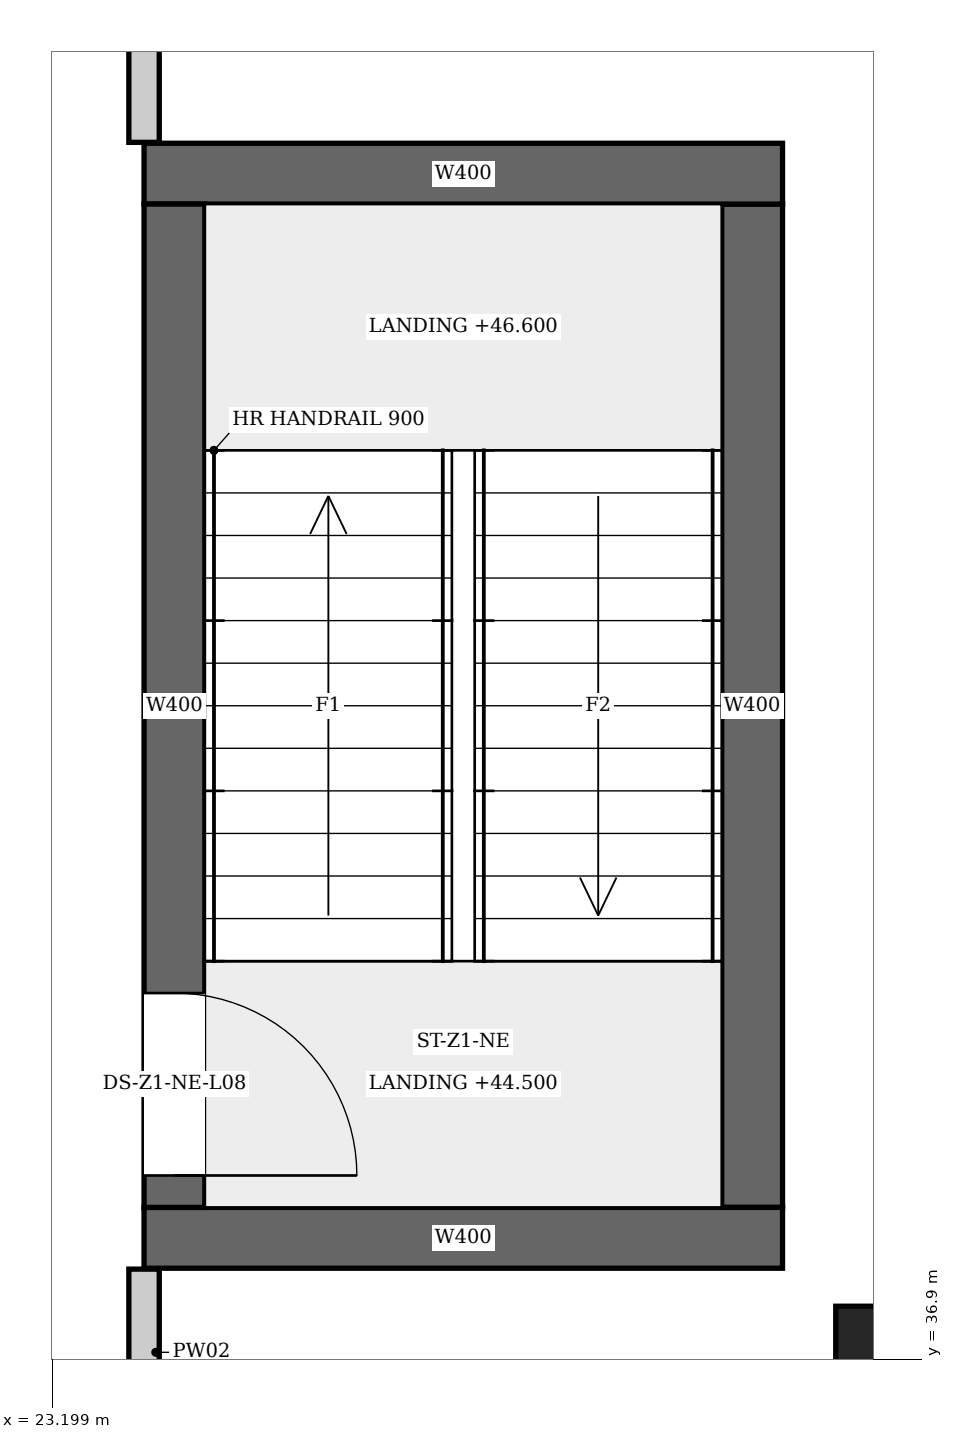
"""IFC4 building model, lengths in metres.
Left out: names, types, materials, properties, quantities, classifications, styles, units other than length and angle.
Written with IfcOpenShell. Run it as: python <this file> out.ifc"""

import sys

from ifc_helpers import new_model, si_unit, direction, frame, frame_2d, origin, origin_2d, place, context, subcontext, project, spatial, rectangle, extrude, element, fill, save


model = new_model("IFC4")
c1 = context("Model", 3, precision=1e-05, world=origin(), true_north=direction((0.0, 1.0)))
c2 = subcontext(c1, "Body", "Model", "MODEL_VIEW")
j1 = project(units=[si_unit("LENGTHUNIT", "METRE"), si_unit("PLANEANGLEUNIT", "RADIAN")], contexts=[c1])
p1 = place(None, origin())
s1 = spatial("IfcSite", under=j1, at=p1, CompositionType="ELEMENT")
p2 = place(p1, origin())
s2 = spatial("IfcBuilding", under=s1, at=p2, CompositionType="ELEMENT")
p3 = place(p2, frame((0.0, 0.0, 44.5)))
s3 = spatial("IfcBuildingStorey", under=s2, at=p3, CompositionType="ELEMENT", Elevation=44.5)
for number, where, z_axis, x_axis in (
    (1, (23.8, 37.7, 0.0), (0.0, 0.0, 1.0), (1.0, 0.0, 0.0)),
    (2, (23.8, 44.7, 0.0), (0.0, 0.0, 1.0), (1.0, 0.0, 0.0)),
):
    element("IfcWall", number, at=place(p3, frame(where, z_axis=z_axis, x_axis=x_axis)), inside=s3, PredefinedType="SHEAR", context=c2, shape_type="SweptSolid", body=[
        extrude(rectangle(XDim=4.2, YDim=0.4, at=frame_2d((2.1, 0.0))), origin(), (0.0, 0.0, 1.0), 4.2),
    ])
p4 = place(p3, frame((24.0, 37.9, 0.0), z_axis=(0.0, 0.0, 1.0), x_axis=(0.0, 1.0, 0.0)))
e3 = element("IfcWall", 3, at=p4, inside=s3, PredefinedType="SHEAR", context=c2, shape_type="SweptSolid", body=[
    extrude(rectangle(XDim=6.6, YDim=0.4, at=frame_2d((3.3, 0.0))), origin(), (0.0, 0.0, 1.0), 4.2),
])
p5 = place(p4, frame((0.21, 0.0, 0.0)))
e4 = element("IfcOpeningElement", 4, at=p5, cuts=e3, PredefinedType="OPENING", context=c2, shape_type="SweptSolid", body=[
    extrude(rectangle(XDim=1.2, YDim=2.1, at=frame_2d((0.6, 1.05))), frame((0.0, 0.21, 0.0), z_axis=(0.0, -1.0, 0.0), x_axis=(1.0, 0.0, 0.0)), (0.0, 0.0, 1.0), 0.42),
])
p6 = place(p3, frame((27.8, 37.9, 0.0), z_axis=(0.0, 0.0, 1.0), x_axis=(0.0, 1.0, 0.0)))
e5 = element("IfcWall", 5, at=p6, inside=s3, PredefinedType="SHEAR", context=c2, shape_type="SweptSolid", body=[
    extrude(rectangle(XDim=6.6, YDim=0.4, at=frame_2d((3.3, 0.0))), origin(), (0.0, 0.0, 1.0), 4.2),
])
p7 = place(p3, frame((28.8, 36.8, 0.0), z_axis=(0.0, 0.0, 1.0), x_axis=(1.0, 0.0, 0.0)))
e6 = element("IfcColumn", 6, at=p7, inside=s3, PredefinedType="COLUMN", context=c2, shape_type="SweptSolid", body=[
    extrude(rectangle(XDim=0.9, YDim=0.9, at=origin_2d()), origin(), (0.0, 0.0, 1.0), 4.2),
])
p8 = place(p3, frame((23.8, 36.4, 0.0), z_axis=(0.0, 0.0, 1.0), x_axis=(0.0, 1.0, 0.0)))
e7 = element("IfcWall", 7, at=p8, inside=s3, PredefinedType="PARTITIONING", context=c2, shape_type="SweptSolid", body=[
    extrude(rectangle(XDim=1.094, YDim=0.2, at=frame_2d((0.547, 0.0))), origin(), (0.0, 0.0, 1.0), 3.9),
])
p9 = place(p3, frame((23.8, 44.906, 0.0), z_axis=(0.0, 0.0, 1.0), x_axis=(0.0, 1.0, 0.0)))
e8 = element("IfcWall", 8, at=p9, inside=s3, PredefinedType="PARTITIONING", context=c2, shape_type="SweptSolid", body=[
    extrude(rectangle(XDim=1.338, YDim=0.2, at=frame_2d((0.669, 0.0))), origin(), (0.0, 0.0, 1.0), 3.9),
])
p10 = place(p5, origin())
e9 = element("IfcDoor", 9, at=p10, inside=s3, OperationType="SINGLE_SWING_LEFT", PredefinedType="DOOR", context=c2, shape_type="SweptSolid", body=[
    extrude(rectangle(XDim=1.2, YDim=2.1, at=frame_2d((0.6, 1.05))), frame((0.0, 0.025, 0.0), z_axis=(0.0, -1.0, 0.0), x_axis=(1.0, 0.0, 0.0)), (0.0, 0.0, 1.0), 0.05),
])
fill(e4, e9)
save(model, sys.argv[1])
